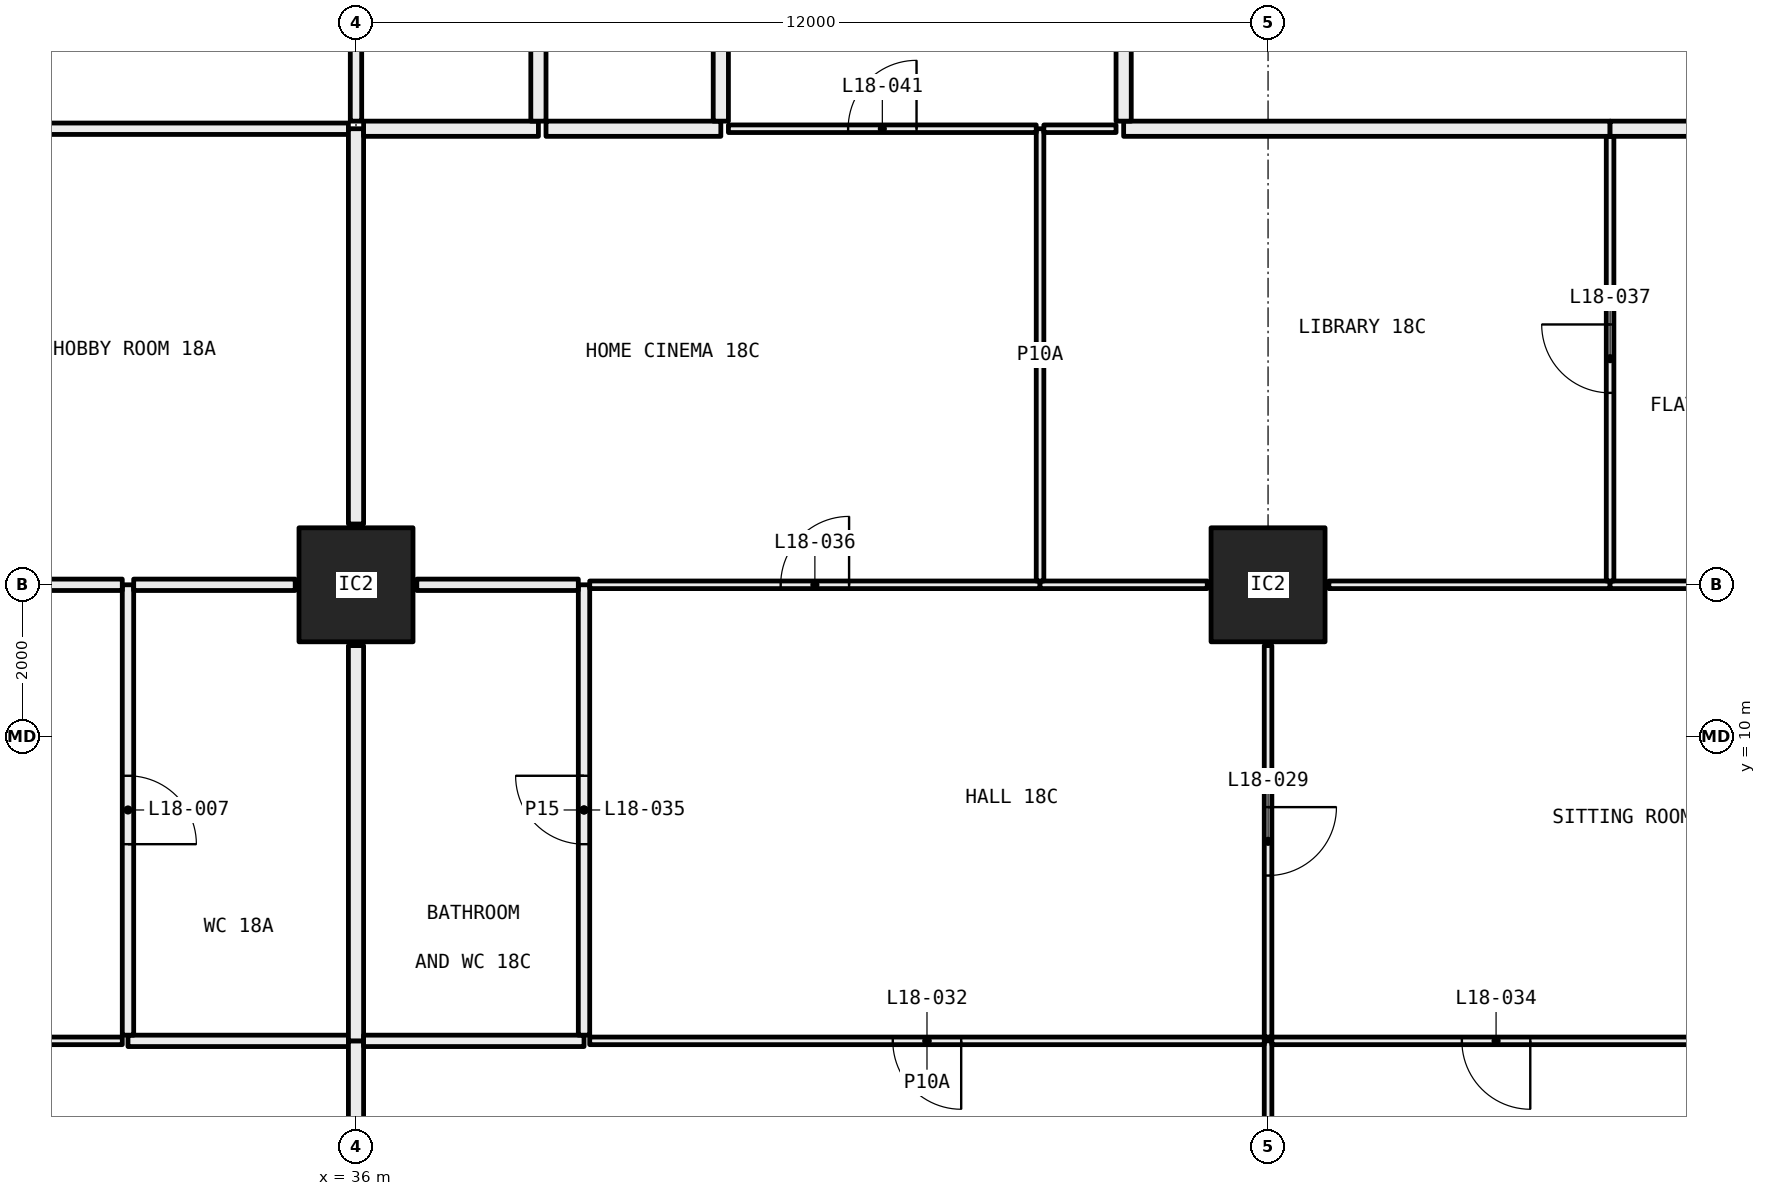
"""IFC4 building model, lengths in metres.
Left out: names, types, materials, properties, quantities, classifications, styles, units other than length and angle.
Written with IfcOpenShell. Run it as: python <this file> out.ifc"""

import sys

from ifc_helpers import new_model, si_unit, direction, frame, frame_2d, origin, origin_2d, place, context, subcontext, project, spatial, rectangle, hollow_rectangle, extrude, element, fill, save


model = new_model("IFC4")
c1 = context("Model", 3, precision=1e-05, world=origin(), true_north=direction((0.0, 1.0)))
c2 = subcontext(c1, "Body", "Model", "MODEL_VIEW")
j1 = project(units=[si_unit("LENGTHUNIT", "METRE"), si_unit("PLANEANGLEUNIT", "RADIAN")], contexts=[c1])
p1 = place(None, origin())
s1 = spatial("IfcSite", under=j1, at=p1, CompositionType="ELEMENT")
p2 = place(p1, origin())
s2 = spatial("IfcBuilding", under=s1, at=p2, CompositionType="ELEMENT")
p3 = place(p2, frame((0.0, 0.0, 74.85)))
s3 = spatial("IfcBuildingStorey", under=s2, at=p3, CompositionType="ELEMENT", Elevation=74.85)
for number, where, z_axis, x_axis in (
    (1, (36.0, 12.0, 0.0), (0.0, 0.0, 1.0), (1.0, 0.0, 0.0)),
    (2, (48.0, 12.0, 0.0), (0.0, 0.0, 1.0), (1.0, 0.0, 0.0)),
):
    element("IfcColumn", number, at=place(p3, frame(where, z_axis=z_axis, x_axis=x_axis)), inside=s3, PredefinedType="COLUMN", context=c2, shape_type="SweptSolid", body=[
        extrude(hollow_rectangle(XDim=1.5, YDim=1.5, WallThickness=0.065, at=origin_2d()), origin(), (0.0, 0.0, 1.0), 3.05),
    ])
p4 = place(p3, frame((32.925, 6.0, 0.0), z_axis=(0.0, 0.0, 1.0), x_axis=(-1.0, 0.0, 0.0)))
e3 = element("IfcWall", 3, at=p4, inside=s3, PredefinedType="PARTITIONING", context=c2, shape_type="SweptSolid", body=[
    extrude(rectangle(XDim=2.875, YDim=0.1, at=frame_2d((1.438, 0.0))), origin(), (0.0, 0.0, 1.0), 3.05),
])
p5 = place(p3, frame((35.9, 6.0, 0.0), z_axis=(0.0, 0.0, 1.0), x_axis=(-1.0, 0.0, 0.0)))
e4 = element("IfcWall", 4, at=p5, inside=s3, PredefinedType="PARTITIONING", context=c2, shape_type="SweptSolid", body=[
    extrude(rectangle(XDim=2.9, YDim=0.15, at=frame_2d((1.45, 0.0))), origin(), (0.0, 0.0, 1.0), 3.05),
])
p6 = place(p3, frame((36.0, 0.72, 0.0), z_axis=(0.0, 0.0, 1.0), x_axis=(0.0, 1.0, 0.0)))
e5 = element("IfcWall", 5, at=p6, inside=s3, PredefinedType="PARTITIONING", context=c2, shape_type="SweptSolid", body=[
    extrude(rectangle(XDim=5.28, YDim=0.2, at=frame_2d((2.64, 0.0))), origin(), (0.0, 0.0, 1.0), 2.45),
])
p7 = place(p3, frame((33.0, 6.075, 0.0), z_axis=(0.0, 0.0, 1.0), x_axis=(0.0, 1.0, 0.0)))
e6 = element("IfcWall", 6, at=p7, inside=s3, PredefinedType="PARTITIONING", context=c2, shape_type="SweptSolid", body=[
    extrude(rectangle(XDim=5.925, YDim=0.15, at=frame_2d((2.962, 0.0))), origin(), (0.0, 0.0, 1.0), 2.45),
])
p8 = place(p7, frame((2.512, 0.0, 0.0)))
e7 = element("IfcOpeningElement", 7, at=p8, cuts=e6, PredefinedType="OPENING", context=c2, shape_type="SweptSolid", body=[
    extrude(rectangle(XDim=0.9, YDim=2.1, at=frame_2d((0.45, 1.05))), frame((0.0, 0.085, 0.0), z_axis=(0.0, -1.0, 0.0), x_axis=(1.0, 0.0, 0.0)), (0.0, 0.0, 1.0), 0.17),
])
p9 = place(p3, frame((32.925, 12.0, 0.0), z_axis=(0.0, 0.0, 1.0), x_axis=(-1.0, 0.0, 0.0)))
e8 = element("IfcWall", 8, at=p9, inside=s3, PredefinedType="PARTITIONING", context=c2, shape_type="SweptSolid", body=[
    extrude(rectangle(XDim=2.925, YDim=0.15, at=frame_2d((1.462, 0.0))), origin(), (0.0, 0.0, 1.0), 2.45),
])
p10 = place(p9, frame((1.012, 0.0, 0.0)))
e9 = element("IfcOpeningElement", 9, at=p10, cuts=e8, PredefinedType="OPENING", context=c2, shape_type="SweptSolid", body=[
    extrude(rectangle(XDim=0.9, YDim=2.1, at=frame_2d((0.45, 1.05))), frame((0.0, 0.085, 0.0), z_axis=(0.0, -1.0, 0.0), x_axis=(1.0, 0.0, 0.0)), (0.0, 0.0, 1.0), 0.17),
])
p11 = place(p3, frame((35.2, 12.0, 0.0), z_axis=(0.0, 0.0, 1.0), x_axis=(-1.0, 0.0, 0.0)))
e10 = element("IfcWall", 10, at=p11, inside=s3, PredefinedType="PARTITIONING", context=c2, shape_type="SweptSolid", body=[
    extrude(rectangle(XDim=2.125, YDim=0.15, at=frame_2d((1.062, 0.0))), origin(), (0.0, 0.0, 1.0), 2.45),
])
p12 = place(p3, frame((36.0, 6.0, 0.0), z_axis=(0.0, 0.0, 1.0), x_axis=(0.0, 1.0, 0.0)))
e11 = element("IfcWall", 11, at=p12, inside=s3, PredefinedType="PARTITIONING", context=c2, shape_type="SweptSolid", body=[
    extrude(rectangle(XDim=5.2, YDim=0.2, at=frame_2d((2.6, 0.0))), origin(), (0.0, 0.0, 1.0), 2.45),
])
p13 = place(p3, frame((35.9, 18.0, 0.0), z_axis=(0.0, 0.0, 1.0), x_axis=(-1.0, 0.0, 0.0)))
e12 = element("IfcWall", 12, at=p13, inside=s3, PredefinedType="PARTITIONING", context=c2, shape_type="SweptSolid", body=[
    extrude(rectangle(XDim=4.4, YDim=0.15, at=frame_2d((2.2, 0.0))), origin(), (0.0, 0.0, 1.0), 3.05),
])
p14 = place(p3, frame((36.0, 12.8, 0.0), z_axis=(0.0, 0.0, 1.0), x_axis=(0.0, 1.0, 0.0)))
e13 = element("IfcWall", 13, at=p14, inside=s3, PredefinedType="PARTITIONING", context=c2, shape_type="SweptSolid", body=[
    extrude(rectangle(XDim=5.2, YDim=0.2, at=frame_2d((2.6, 0.0))), origin(), (0.0, 0.0, 1.0), 2.45),
])
p15 = place(p3, frame((36.0, 18.1, 0.0), z_axis=(0.0, 0.0, 1.0), x_axis=(0.0, 1.0, 0.0)))
e14 = element("IfcWall", 14, at=p15, inside=s3, PredefinedType="PARTITIONING", context=c2, shape_type="SweptSolid", body=[
    extrude(rectangle(XDim=5.1, YDim=0.15, at=frame_2d((2.55, 0.0))), origin(), (0.0, 0.0, 1.0), 2.45),
])
p16 = place(p15, frame((2.1, 0.0, 0.0)))
e15 = element("IfcOpeningElement", 15, at=p16, cuts=e14, PredefinedType="OPENING", context=c2, shape_type="SweptSolid", body=[
    extrude(rectangle(XDim=0.9, YDim=2.1, at=frame_2d((0.45, 1.05))), frame((0.0, 0.085, 0.0), z_axis=(0.0, -1.0, 0.0), x_axis=(1.0, 0.0, 0.0)), (0.0, 0.0, 1.0), 0.17),
])
p17 = place(p3, frame((36.1, 18.0, 0.0), z_axis=(0.0, 0.0, 1.0), x_axis=(1.0, 0.0, 0.0)))
e16 = element("IfcWall", 16, at=p17, inside=s3, PredefinedType="PARTITIONING", context=c2, shape_type="SweptSolid", body=[
    extrude(rectangle(XDim=2.3, YDim=0.2, at=frame_2d((1.15, 0.0))), origin(), (0.0, 0.0, 1.0), 3.05),
])
p18 = place(p3, frame((38.4, 18.1, 0.0), z_axis=(0.0, 0.0, 1.0), x_axis=(0.0, 1.0, 0.0)))
e17 = element("IfcWall", 17, at=p18, inside=s3, PredefinedType="PARTITIONING", context=c2, shape_type="SweptSolid", body=[
    extrude(rectangle(XDim=6.2, YDim=0.2, at=frame_2d((3.1, 0.0))), origin(), (0.0, 0.0, 1.0), 2.45),
])
p19 = place(p3, frame((48.0, 0.72, 0.0), z_axis=(0.0, 0.0, 1.0), x_axis=(0.0, 1.0, 0.0)))
e18 = element("IfcWall", 18, at=p19, inside=s3, PredefinedType="PARTITIONING", context=c2, shape_type="SweptSolid", body=[
    extrude(rectangle(XDim=5.28, YDim=0.1, at=frame_2d((2.64, 0.0))), origin(), (0.0, 0.0, 1.0), 2.45),
])
p20 = place(p3, frame((39.0, 6.0, 0.0), z_axis=(0.0, 0.0, 1.0), x_axis=(-1.0, 0.0, 0.0)))
e19 = element("IfcWall", 19, at=p20, inside=s3, PredefinedType="PARTITIONING", context=c2, shape_type="SweptSolid", body=[
    extrude(rectangle(XDim=2.9, YDim=0.15, at=frame_2d((1.45, 0.0))), origin(), (0.0, 0.0, 1.0), 3.05),
])
p21 = place(p3, frame((47.95, 6.0, 0.0), z_axis=(0.0, 0.0, 1.0), x_axis=(-1.0, 0.0, 0.0)))
e20 = element("IfcWall", 20, at=p21, inside=s3, PredefinedType="PARTITIONING", context=c2, shape_type="SweptSolid", body=[
    extrude(rectangle(XDim=8.875, YDim=0.1, at=frame_2d((4.438, 0.0))), origin(), (0.0, 0.0, 1.0), 2.45),
])
p22 = place(p21, frame((3.988, 0.0, 0.0)))
e21 = element("IfcOpeningElement", 21, at=p22, cuts=e20, PredefinedType="OPENING", context=c2, shape_type="SweptSolid", body=[
    extrude(rectangle(XDim=0.9, YDim=2.1, at=frame_2d((0.45, 1.05))), frame((0.0, 0.06, 0.0), z_axis=(0.0, -1.0, 0.0), x_axis=(1.0, 0.0, 0.0)), (0.0, 0.0, 1.0), 0.12),
])
p23 = place(p3, frame((53.95, 6.0, 0.0), z_axis=(0.0, 0.0, 1.0), x_axis=(-1.0, 0.0, 0.0)))
e22 = element("IfcWall", 22, at=p23, inside=s3, PredefinedType="PARTITIONING", context=c2, shape_type="SweptSolid", body=[
    extrude(rectangle(XDim=5.9, YDim=0.1, at=frame_2d((2.95, 0.0))), origin(), (0.0, 0.0, 1.0), 2.45),
])
p24 = place(p23, frame((2.5, 0.0, 0.0)))
e23 = element("IfcOpeningElement", 23, at=p24, cuts=e22, PredefinedType="OPENING", context=c2, shape_type="SweptSolid", body=[
    extrude(rectangle(XDim=0.9, YDim=2.1, at=frame_2d((0.45, 1.05))), frame((0.0, 0.06, 0.0), z_axis=(0.0, -1.0, 0.0), x_axis=(1.0, 0.0, 0.0)), (0.0, 0.0, 1.0), 0.12),
])
p25 = place(p3, frame((39.0, 6.075, 0.0), z_axis=(0.0, 0.0, 1.0), x_axis=(0.0, 1.0, 0.0)))
e24 = element("IfcWall", 24, at=p25, inside=s3, PredefinedType="PARTITIONING", context=c2, shape_type="SweptSolid", body=[
    extrude(rectangle(XDim=5.925, YDim=0.15, at=frame_2d((2.962, 0.0))), origin(), (0.0, 0.0, 1.0), 2.45),
])
p26 = place(p25, frame((2.512, 0.0, 0.0)))
e25 = element("IfcOpeningElement", 25, at=p26, cuts=e24, PredefinedType="OPENING", context=c2, shape_type="SweptSolid", body=[
    extrude(rectangle(XDim=0.9, YDim=2.1, at=frame_2d((0.45, 1.05))), frame((0.0, 0.085, 0.0), z_axis=(0.0, -1.0, 0.0), x_axis=(1.0, 0.0, 0.0)), (0.0, 0.0, 1.0), 0.17),
])
p27 = place(p3, frame((38.925, 12.0, 0.0), z_axis=(0.0, 0.0, 1.0), x_axis=(-1.0, 0.0, 0.0)))
e26 = element("IfcWall", 26, at=p27, inside=s3, PredefinedType="PARTITIONING", context=c2, shape_type="SweptSolid", body=[
    extrude(rectangle(XDim=2.125, YDim=0.15, at=frame_2d((1.062, 0.0))), origin(), (0.0, 0.0, 1.0), 2.45),
])
p28 = place(p3, frame((48.0, 6.05, 0.0), z_axis=(0.0, 0.0, 1.0), x_axis=(0.0, 1.0, 0.0)))
e27 = element("IfcWall", 27, at=p28, inside=s3, PredefinedType="PARTITIONING", context=c2, shape_type="SweptSolid", body=[
    extrude(rectangle(XDim=5.15, YDim=0.1, at=frame_2d((2.575, 0.0))), origin(), (0.0, 0.0, 1.0), 2.45),
])
p29 = place(p28, frame((2.125, 0.0, 0.0)))
e28 = element("IfcOpeningElement", 28, at=p29, cuts=e27, PredefinedType="OPENING", context=c2, shape_type="SweptSolid", body=[
    extrude(rectangle(XDim=0.9, YDim=2.1, at=frame_2d((0.45, 1.05))), frame((0.0, 0.06, 0.0), z_axis=(0.0, -1.0, 0.0), x_axis=(1.0, 0.0, 0.0)), (0.0, 0.0, 1.0), 0.12),
])
p30 = place(p3, frame((45.0, 12.0, 0.0), z_axis=(0.0, 0.0, 1.0), x_axis=(-1.0, 0.0, 0.0)))
e29 = element("IfcWall", 29, at=p30, inside=s3, PredefinedType="PARTITIONING", context=c2, shape_type="SweptSolid", body=[
    extrude(rectangle(XDim=5.925, YDim=0.1, at=frame_2d((2.962, 0.0))), origin(), (0.0, 0.0, 1.0), 2.45),
])
p31 = place(p30, frame((2.512, 0.0, 0.0)))
e30 = element("IfcOpeningElement", 30, at=p31, cuts=e29, PredefinedType="OPENING", context=c2, shape_type="SweptSolid", body=[
    extrude(rectangle(XDim=0.9, YDim=2.1, at=frame_2d((0.45, 1.05))), frame((0.0, 0.06, 0.0), z_axis=(0.0, -1.0, 0.0), x_axis=(1.0, 0.0, 0.0)), (0.0, 0.0, 1.0), 0.12),
])
p32 = place(p3, frame((47.2, 12.0, 0.0), z_axis=(0.0, 0.0, 1.0), x_axis=(-1.0, 0.0, 0.0)))
e31 = element("IfcWall", 31, at=p32, inside=s3, PredefinedType="PARTITIONING", context=c2, shape_type="SweptSolid", body=[
    extrude(rectangle(XDim=2.2, YDim=0.1, at=frame_2d((1.1, 0.0))), origin(), (0.0, 0.0, 1.0), 2.45),
])
p33 = place(p3, frame((52.5, 12.0, 0.0), z_axis=(0.0, 0.0, 1.0), x_axis=(-1.0, 0.0, 0.0)))
e32 = element("IfcWall", 32, at=p33, inside=s3, PredefinedType="PARTITIONING", context=c2, shape_type="SweptSolid", body=[
    extrude(rectangle(XDim=3.7, YDim=0.1, at=frame_2d((1.85, 0.0))), origin(), (0.0, 0.0, 1.0), 2.45),
])
p34 = place(p3, frame((56.95, 12.0, 0.0), z_axis=(0.0, 0.0, 1.0), x_axis=(-1.0, 0.0, 0.0)))
e33 = element("IfcWall", 33, at=p34, inside=s3, PredefinedType="PARTITIONING", context=c2, shape_type="SweptSolid", body=[
    extrude(rectangle(XDim=4.45, YDim=0.1, at=frame_2d((2.225, 0.0))), origin(), (0.0, 0.0, 1.0), 2.45),
])
p35 = place(p34, frame((1.775, 0.0, 0.0)))
e34 = element("IfcOpeningElement", 34, at=p35, cuts=e33, PredefinedType="OPENING", context=c2, shape_type="SweptSolid", body=[
    extrude(rectangle(XDim=0.9, YDim=2.1, at=frame_2d((0.45, 1.05))), frame((0.0, 0.06, 0.0), z_axis=(0.0, -1.0, 0.0), x_axis=(1.0, 0.0, 0.0)), (0.0, 0.0, 1.0), 0.12),
])
p36 = place(p3, frame((45.0, 12.05, 0.0), z_axis=(0.0, 0.0, 1.0), x_axis=(0.0, 1.0, 0.0)))
e35 = element("IfcWall", 35, at=p36, inside=s3, PredefinedType="PARTITIONING", context=c2, shape_type="SweptSolid", body=[
    extrude(rectangle(XDim=5.95, YDim=0.1, at=frame_2d((2.975, 0.0))), origin(), (0.0, 0.0, 1.0), 2.45),
])
p37 = place(p3, frame((44.95, 18.0, 0.0), z_axis=(0.0, 0.0, 1.0), x_axis=(-1.0, 0.0, 0.0)))
e36 = element("IfcWall", 36, at=p37, inside=s3, PredefinedType="PARTITIONING", context=c2, shape_type="SweptSolid", body=[
    extrude(rectangle(XDim=4.05, YDim=0.1, at=frame_2d((2.025, 0.0))), origin(), (0.0, 0.0, 1.0), 3.05),
])
p38 = place(p37, frame((1.575, 0.0, 0.0)))
e37 = element("IfcOpeningElement", 37, at=p38, cuts=e36, PredefinedType="OPENING", context=c2, shape_type="SweptSolid", body=[
    extrude(rectangle(XDim=0.9, YDim=2.1, at=frame_2d((0.45, 1.05))), frame((0.0, 0.06, 0.0), z_axis=(0.0, -1.0, 0.0), x_axis=(1.0, 0.0, 0.0)), (0.0, 0.0, 1.0), 0.12),
])
p39 = place(p3, frame((40.8, 18.0, 0.0), z_axis=(0.0, 0.0, 1.0), x_axis=(-1.0, 0.0, 0.0)))
e38 = element("IfcWall", 38, at=p39, inside=s3, PredefinedType="PARTITIONING", context=c2, shape_type="SweptSolid", body=[
    extrude(rectangle(XDim=2.3, YDim=0.2, at=frame_2d((1.15, 0.0))), origin(), (0.0, 0.0, 1.0), 3.05),
])
p40 = place(p3, frame((52.5, 12.05, 0.0), z_axis=(0.0, 0.0, 1.0), x_axis=(0.0, 1.0, 0.0)))
e39 = element("IfcWall", 39, at=p40, inside=s3, PredefinedType="PARTITIONING", context=c2, shape_type="SweptSolid", body=[
    extrude(rectangle(XDim=5.85, YDim=0.1, at=frame_2d((2.925, 0.0))), origin(), (0.0, 0.0, 1.0), 2.45),
])
p41 = place(p40, frame((2.475, 0.0, 0.0)))
e40 = element("IfcOpeningElement", 40, at=p41, cuts=e39, PredefinedType="OPENING", context=c2, shape_type="SweptSolid", body=[
    extrude(rectangle(XDim=0.9, YDim=2.1, at=frame_2d((0.45, 1.05))), frame((0.0, 0.06, 0.0), z_axis=(0.0, -1.0, 0.0), x_axis=(1.0, 0.0, 0.0)), (0.0, 0.0, 1.0), 0.12),
])
p42 = place(p3, frame((46.0, 18.0, 0.0), z_axis=(0.0, 0.0, 1.0), x_axis=(-1.0, 0.0, 0.0)))
e41 = element("IfcWall", 41, at=p42, inside=s3, PredefinedType="PARTITIONING", context=c2, shape_type="SweptSolid", body=[
    extrude(rectangle(XDim=0.95, YDim=0.1, at=frame_2d((0.475, 0.0))), origin(), (0.0, 0.0, 1.0), 3.05),
])
p43 = place(p3, frame((52.5, 18.0, 0.0), z_axis=(0.0, 0.0, 1.0), x_axis=(-1.0, 0.0, 0.0)))
e42 = element("IfcWall", 42, at=p43, inside=s3, PredefinedType="PARTITIONING", context=c2, shape_type="SweptSolid", body=[
    extrude(rectangle(XDim=6.4, YDim=0.2, at=frame_2d((3.2, 0.0))), origin(), (0.0, 0.0, 1.0), 3.05),
])
p44 = place(p3, frame((57.0, 18.0, 0.0), z_axis=(0.0, 0.0, 1.0), x_axis=(-1.0, 0.0, 0.0)))
e43 = element("IfcWall", 43, at=p44, inside=s3, PredefinedType="PARTITIONING", context=c2, shape_type="SweptSolid", body=[
    extrude(rectangle(XDim=4.5, YDim=0.2, at=frame_2d((2.25, 0.0))), origin(), (0.0, 0.0, 1.0), 3.05),
])
p45 = place(p44, frame((1.75, 0.0, 0.0)))
e44 = element("IfcOpeningElement", 44, at=p45, cuts=e43, PredefinedType="OPENING", context=c2, shape_type="SweptSolid", body=[
    extrude(rectangle(XDim=1.0, YDim=2.1, at=frame_2d((0.5, 1.05))), frame((0.0, 0.11, 0.0), z_axis=(0.0, -1.0, 0.0), x_axis=(1.0, 0.0, 0.0)), (0.0, 0.0, 1.0), 0.22),
])
p46 = place(p3, frame((40.8, 23.9, 0.0), z_axis=(0.0, 0.0, 1.0), x_axis=(0.0, -1.0, 0.0)))
e45 = element("IfcWall", 45, at=p46, inside=s3, PredefinedType="PARTITIONING", context=c2, shape_type="SweptSolid", body=[
    extrude(rectangle(XDim=5.8, YDim=0.2, at=frame_2d((2.9, 0.0))), origin(), (0.0, 0.0, 1.0), 3.05),
])
p47 = place(p3, frame((46.1, 18.1, 0.0), z_axis=(0.0, 0.0, 1.0), x_axis=(0.0, 1.0, 0.0)))
e46 = element("IfcWall", 46, at=p47, inside=s3, PredefinedType="PARTITIONING", context=c2, shape_type="SweptSolid", body=[
    extrude(rectangle(XDim=6.2, YDim=0.2, at=frame_2d((3.1, 0.0))), origin(), (0.0, 0.0, 1.0), 2.45),
])
p48 = place(p8, frame((0.9, 0.0, 0.0), x_axis=(-1.0, 0.0, 0.0)))
e47 = element("IfcDoor", 47, at=p48, inside=s3, OperationType="SINGLE_SWING_LEFT", PredefinedType="DOOR", context=c2, shape_type="SweptSolid", body=[
    extrude(rectangle(XDim=0.9, YDim=2.1, at=frame_2d((0.45, 1.05))), frame((0.0, 0.025, 0.0), z_axis=(0.0, -1.0, 0.0), x_axis=(1.0, 0.0, 0.0)), (0.0, 0.0, 1.0), 0.05),
])
fill(e7, e47)
p49 = place(p29, frame((0.9, 0.0, 0.0), x_axis=(-1.0, 0.0, 0.0)))
e48 = element("IfcDoor", 48, at=p49, inside=s3, OperationType="SINGLE_SWING_RIGHT", PredefinedType="DOOR", context=c2, shape_type="SweptSolid", body=[
    extrude(rectangle(XDim=0.9, YDim=2.1, at=frame_2d((0.45, 1.05))), frame((0.0, 0.025, 0.0), z_axis=(0.0, -1.0, 0.0), x_axis=(1.0, 0.0, 0.0)), (0.0, 0.0, 1.0), 0.05),
])
fill(e28, e48)
p50 = place(p22, origin())
e49 = element("IfcDoor", 49, at=p50, inside=s3, OperationType="SINGLE_SWING_RIGHT", PredefinedType="DOOR", context=c2, shape_type="SweptSolid", body=[
    extrude(rectangle(XDim=0.9, YDim=2.1, at=frame_2d((0.45, 1.05))), frame((0.0, 0.025, 0.0), z_axis=(0.0, -1.0, 0.0), x_axis=(1.0, 0.0, 0.0)), (0.0, 0.0, 1.0), 0.05),
])
fill(e21, e49)
p51 = place(p24, origin())
e50 = element("IfcDoor", 50, at=p51, inside=s3, OperationType="SINGLE_SWING_RIGHT", PredefinedType="DOOR", context=c2, shape_type="SweptSolid", body=[
    extrude(rectangle(XDim=0.9, YDim=2.1, at=frame_2d((0.45, 1.05))), frame((0.0, 0.025, 0.0), z_axis=(0.0, -1.0, 0.0), x_axis=(1.0, 0.0, 0.0)), (0.0, 0.0, 1.0), 0.05),
])
fill(e23, e50)
p52 = place(p26, origin())
e51 = element("IfcDoor", 51, at=p52, inside=s3, OperationType="SINGLE_SWING_LEFT", PredefinedType="DOOR", context=c2, shape_type="SweptSolid", body=[
    extrude(rectangle(XDim=0.9, YDim=2.1, at=frame_2d((0.45, 1.05))), frame((0.0, 0.025, 0.0), z_axis=(0.0, -1.0, 0.0), x_axis=(1.0, 0.0, 0.0)), (0.0, 0.0, 1.0), 0.05),
])
fill(e25, e51)
p53 = place(p31, frame((0.9, 0.0, 0.0), x_axis=(-1.0, 0.0, 0.0)))
e52 = element("IfcDoor", 52, at=p53, inside=s3, OperationType="SINGLE_SWING_LEFT", PredefinedType="DOOR", context=c2, shape_type="SweptSolid", body=[
    extrude(rectangle(XDim=0.9, YDim=2.1, at=frame_2d((0.45, 1.05))), frame((0.0, 0.025, 0.0), z_axis=(0.0, -1.0, 0.0), x_axis=(1.0, 0.0, 0.0)), (0.0, 0.0, 1.0), 0.05),
])
fill(e30, e52)
p54 = place(p41, origin())
e53 = element("IfcDoor", 53, at=p54, inside=s3, OperationType="SINGLE_SWING_LEFT", PredefinedType="DOOR", context=c2, shape_type="SweptSolid", body=[
    extrude(rectangle(XDim=0.9, YDim=2.1, at=frame_2d((0.45, 1.05))), frame((0.0, 0.025, 0.0), z_axis=(0.0, -1.0, 0.0), x_axis=(1.0, 0.0, 0.0)), (0.0, 0.0, 1.0), 0.05),
])
fill(e40, e53)
p55 = place(p38, frame((0.9, 0.0, 0.0), x_axis=(-1.0, 0.0, 0.0)))
e54 = element("IfcDoor", 54, at=p55, inside=s3, OperationType="SINGLE_SWING_LEFT", PredefinedType="DOOR", context=c2, shape_type="SweptSolid", body=[
    extrude(rectangle(XDim=0.9, YDim=2.1, at=frame_2d((0.45, 1.05))), frame((0.0, 0.025, 0.0), z_axis=(0.0, -1.0, 0.0), x_axis=(1.0, 0.0, 0.0)), (0.0, 0.0, 1.0), 0.05),
])
fill(e37, e54)
save(model, sys.argv[1])
